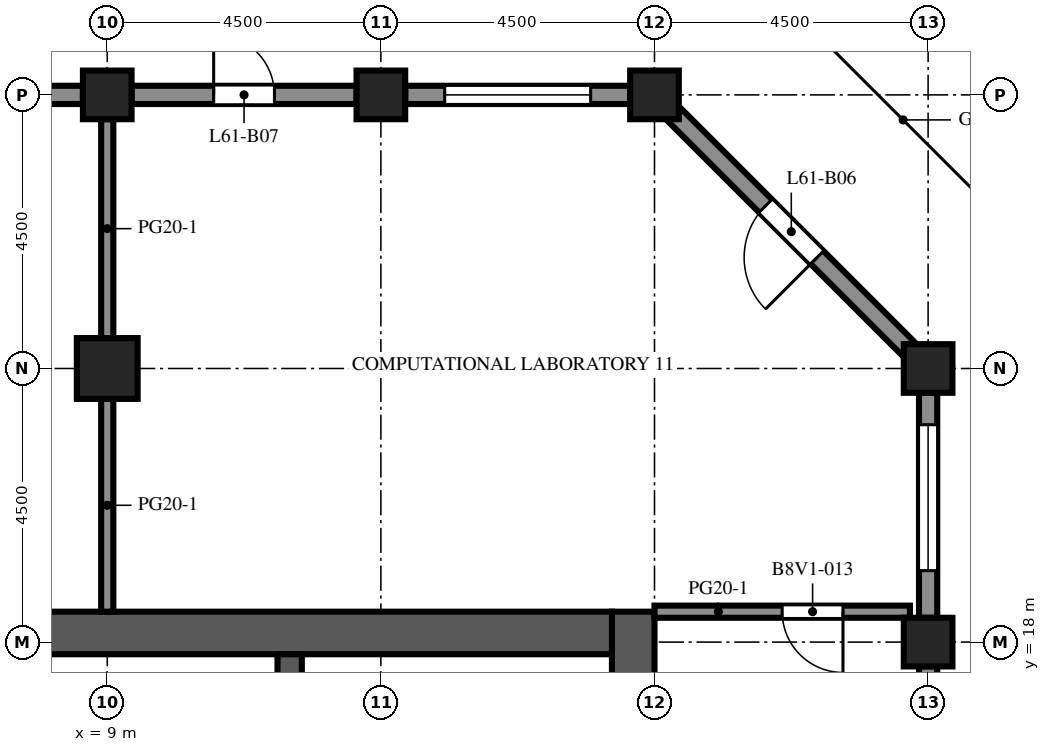
"""IFC4 building model, lengths in metres.
Left out: names, types, materials, properties, quantities, classifications, styles, units other than length and angle.
Written with IfcOpenShell. Run it as: python <this file> out.ifc"""

import sys

from ifc_helpers import new_model, si_unit, direction, frame, frame_2d, origin, origin_2d, place, context, subcontext, project, spatial, rectangle, extrude, element, fill, save


model = new_model("IFC4")
c1 = context("Model", 3, precision=1e-05, world=origin(), true_north=direction((0.0, 1.0)))
c2 = subcontext(c1, "Body", "Model", "MODEL_VIEW")
j1 = project(units=[si_unit("LENGTHUNIT", "METRE"), si_unit("PLANEANGLEUNIT", "RADIAN")], contexts=[c1])
p1 = place(None, origin())
s1 = spatial("IfcSite", under=j1, at=p1, CompositionType="ELEMENT")
p2 = place(p1, origin())
s2 = spatial("IfcBuilding", under=s1, at=p2, CompositionType="ELEMENT")
p3 = place(p2, frame((0.0, 0.0, 270.4)))
s3 = spatial("IfcBuildingStorey", under=s2, at=p3, CompositionType="ELEMENT", Elevation=270.4)
for number, where, z_axis, x_axis in (
    (1, (9.0, 27.0, 0.0), (0.0, 0.0, 1.0), (1.0, 0.0, 0.0)),
    (2, (13.5, 27.0, 0.0), (0.0, 0.0, 1.0), (1.0, 0.0, 0.0)),
    (3, (18.0, 27.0, 0.0), (0.0, 0.0, 1.0), (1.0, 0.0, 0.0)),
    (4, (22.5, 18.0, 0.0), (0.0, 0.0, 1.0), (1.0, 0.0, 0.0)),
    (5, (22.5, 22.5, 0.0), (0.0, 0.0, 1.0), (1.0, 0.0, 0.0)),
):
    element("IfcColumn", number, at=place(p3, frame(where, z_axis=z_axis, x_axis=x_axis)), inside=s3, PredefinedType="COLUMN", context=c2, shape_type="SweptSolid", body=[
        extrude(rectangle(XDim=0.8, YDim=0.8, at=origin_2d()), origin(), (0.0, 0.0, 1.0), 4.1),
    ])
p4 = place(p3, frame((9.0, 22.5, 0.0), z_axis=(0.0, 0.0, 1.0), x_axis=(1.0, 0.0, 0.0)))
e6 = element("IfcColumn", 6, at=p4, inside=s3, PredefinedType="COLUMN", context=c2, shape_type="SweptSolid", body=[
    extrude(rectangle(XDim=1.0, YDim=1.0, at=origin_2d()), origin(), (0.0, 0.0, 1.0), 4.1),
])
p5 = place(p3, frame((17.65, -9.0, 0.0), z_axis=(0.0, 0.0, 1.0), x_axis=(0.0, 1.0, 0.0)))
e7 = element("IfcWall", 7, at=p5, inside=s3, PredefinedType="SHEAR", context=c2, shape_type="SweptSolid", body=[
    extrude(rectangle(XDim=27.5, YDim=0.7, at=frame_2d((13.75, 0.0))), origin(), (0.0, 0.0, 1.0), 4.1),
])
p6 = place(p5, frame((12.55, 0.0, 0.0)))
e8 = element("IfcOpeningElement", 8, at=p6, cuts=e7, PredefinedType="OPENING", context=c2, shape_type="SweptSolid", body=[
    extrude(rectangle(XDim=2.4, YDim=2.4, at=frame_2d((1.2, 1.2))), frame((0.0, 0.36, 0.0), z_axis=(0.0, -1.0, 0.0), x_axis=(1.0, 0.0, 0.0)), (0.0, 0.0, 1.0), 0.72),
])
p7 = place(p5, frame((6.825, 0.0, 0.0)))
e9 = element("IfcOpeningElement", 9, at=p7, cuts=e7, PredefinedType="OPENING", context=c2, shape_type="SweptSolid", body=[
    extrude(rectangle(XDim=1.2, YDim=2.1, at=frame_2d((0.6, 1.05))), frame((0.0, 0.36, 0.0), z_axis=(0.0, -1.0, 0.0), x_axis=(1.0, 0.0, 0.0)), (0.0, 0.0, 1.0), 0.72),
])
p8 = place(p5, frame((19.475, 0.0, 0.0)))
e10 = element("IfcOpeningElement", 10, at=p8, cuts=e7, PredefinedType="OPENING", context=c2, shape_type="SweptSolid", body=[
    extrude(rectangle(XDim=1.2, YDim=2.1, at=frame_2d((0.6, 1.05))), frame((0.0, 0.36, 0.0), z_axis=(0.0, -1.0, 0.0), x_axis=(1.0, 0.0, 0.0)), (0.0, 0.0, 1.0), 0.72),
])
p9 = place(p3, frame((6.7, 18.15, 0.0), z_axis=(0.0, 0.0, 1.0), x_axis=(1.0, 0.0, 0.0)))
e11 = element("IfcWall", 11, at=p9, inside=s3, PredefinedType="SHEAR", context=c2, shape_type="SweptSolid", body=[
    extrude(rectangle(XDim=10.6, YDim=0.7, at=frame_2d((5.3, 0.0))), origin(), (0.0, 0.0, 1.0), 4.1),
])
p10 = place(p3, frame((12.0, 10.2, 0.0), z_axis=(0.0, 0.0, 1.0), x_axis=(0.0, 1.0, 0.0)))
e12 = element("IfcWall", 12, at=p10, inside=s3, PredefinedType="SHEAR", context=c2, shape_type="SweptSolid", body=[
    extrude(rectangle(XDim=7.6, YDim=0.4, at=frame_2d((3.8, 0.0))), origin(), (0.0, 0.0, 1.0), 4.1),
])
p11 = place(p3, frame((22.5, 17.6, 0.0), z_axis=(0.0, 0.0, 1.0), x_axis=(0.0, -1.0, 0.0)))
e13 = element("IfcWall", 13, at=p11, inside=s3, PredefinedType="SOLIDWALL", context=c2, shape_type="SweptSolid", body=[
    extrude(rectangle(XDim=3.7, YDim=0.3, at=frame_2d((1.85, 0.0))), origin(), (0.0, 0.0, 1.0), 2.85),
])
p12 = place(p11, frame((1.35, 0.0, 0.0)))
e14 = element("IfcOpeningElement", 14, at=p12, cuts=e13, PredefinedType="OPENING", context=c2, shape_type="SweptSolid", body=[
    extrude(rectangle(XDim=1.0, YDim=2.2, at=frame_2d((0.5, 1.1))), frame((0.0, 0.16, 0.0), z_axis=(0.0, -1.0, 0.0), x_axis=(1.0, 0.0, 0.0)), (0.0, 0.0, 1.0), 0.32),
])
p13 = place(p3, frame((22.5, 22.1, 0.0), z_axis=(0.0, 0.0, 1.0), x_axis=(0.0, -1.0, 0.0)))
e15 = element("IfcWall", 15, at=p13, inside=s3, PredefinedType="SOLIDWALL", context=c2, shape_type="SweptSolid", body=[
    extrude(rectangle(XDim=3.7, YDim=0.3, at=frame_2d((1.85, 0.0))), origin(), (0.0, 0.0, 1.0), 2.85),
])
p14 = place(p13, frame((0.525, 0.0, 0.8)))
e16 = element("IfcOpeningElement", 16, at=p14, cuts=e15, PredefinedType="OPENING", context=c2, shape_type="SweptSolid", body=[
    extrude(rectangle(XDim=2.4, YDim=1.7, at=frame_2d((1.2, 0.85))), frame((0.0, 0.16, 0.0), z_axis=(0.0, -1.0, 0.0), x_axis=(1.0, 0.0, 0.0)), (0.0, 0.0, 1.0), 0.32),
])
p15 = place(p3, frame((18.294, 26.706, 0.0), z_axis=(0.0, 0.0, 1.0), x_axis=(0.707106781187, -0.707106781187, 0.0)))
e17 = element("IfcWall", 17, at=p15, inside=s3, PredefinedType="SOLIDWALL", context=c2, shape_type="SweptSolid", body=[
    extrude(rectangle(XDim=5.532, YDim=0.3, at=frame_2d((2.766, 0.0))), origin(), (0.0, 0.0, 1.0), 2.85),
])
p16 = place(p15, frame((2.166, 0.0, 0.0)))
e18 = element("IfcOpeningElement", 18, at=p16, cuts=e17, PredefinedType="OPENING", context=c2, shape_type="SweptSolid", body=[
    extrude(rectangle(XDim=1.2, YDim=2.2, at=frame_2d((0.6, 1.1))), frame((0.0, 0.16, 0.0), z_axis=(0.0, -1.0, 0.0), x_axis=(1.0, 0.0, 0.0)), (0.0, 0.0, 1.0), 0.32),
])
p17 = place(p3, frame((13.9, 27.0, 0.0), z_axis=(0.0, 0.0, 1.0), x_axis=(1.0, 0.0, 0.0)))
e19 = element("IfcWall", 19, at=p17, inside=s3, PredefinedType="SOLIDWALL", context=c2, shape_type="SweptSolid", body=[
    extrude(rectangle(XDim=3.7, YDim=0.3, at=frame_2d((1.85, 0.0))), origin(), (0.0, 0.0, 1.0), 2.85),
])
p18 = place(p17, frame((0.65, 0.0, 0.8)))
e20 = element("IfcOpeningElement", 20, at=p18, cuts=e19, PredefinedType="OPENING", context=c2, shape_type="SweptSolid", body=[
    extrude(rectangle(XDim=2.4, YDim=1.7, at=frame_2d((1.2, 0.85))), frame((0.0, 0.16, 0.0), z_axis=(0.0, -1.0, 0.0), x_axis=(1.0, 0.0, 0.0)), (0.0, 0.0, 1.0), 0.32),
])
p19 = place(p3, frame((9.4, 27.0, 0.0), z_axis=(0.0, 0.0, 1.0), x_axis=(1.0, 0.0, 0.0)))
e21 = element("IfcWall", 21, at=p19, inside=s3, PredefinedType="SOLIDWALL", context=c2, shape_type="SweptSolid", body=[
    extrude(rectangle(XDim=3.7, YDim=0.3, at=frame_2d((1.85, 0.0))), origin(), (0.0, 0.0, 1.0), 2.85),
])
p20 = place(p19, frame((1.35, 0.0, 0.0)))
e22 = element("IfcOpeningElement", 22, at=p20, cuts=e21, PredefinedType="OPENING", context=c2, shape_type="SweptSolid", body=[
    extrude(rectangle(XDim=1.0, YDim=2.2, at=frame_2d((0.5, 1.1))), frame((0.0, 0.16, 0.0), z_axis=(0.0, -1.0, 0.0), x_axis=(1.0, 0.0, 0.0)), (0.0, 0.0, 1.0), 0.32),
])
p21 = place(p3, frame((4.9, 27.0, 0.0), z_axis=(0.0, 0.0, 1.0), x_axis=(1.0, 0.0, 0.0)))
e23 = element("IfcWall", 23, at=p21, inside=s3, PredefinedType="SOLIDWALL", context=c2, shape_type="SweptSolid", body=[
    extrude(rectangle(XDim=3.7, YDim=0.3, at=frame_2d((1.85, 0.0))), origin(), (0.0, 0.0, 1.0), 2.85),
])
p22 = place(p21, frame((0.65, 0.0, 0.8)))
e24 = element("IfcOpeningElement", 24, at=p22, cuts=e23, PredefinedType="OPENING", context=c2, shape_type="SweptSolid", body=[
    extrude(rectangle(XDim=2.4, YDim=1.7, at=frame_2d((1.2, 0.85))), frame((0.0, 0.16, 0.0), z_axis=(0.0, -1.0, 0.0), x_axis=(1.0, 0.0, 0.0)), (0.0, 0.0, 1.0), 0.32),
])
p23 = place(p3, frame((9.0, 18.5, 0.0), z_axis=(0.0, 0.0, 1.0), x_axis=(0.0, 1.0, 0.0)))
e25 = element("IfcWall", 25, at=p23, inside=s3, PredefinedType="PARTITIONING", context=c2, shape_type="SweptSolid", body=[
    extrude(rectangle(XDim=3.5, YDim=0.2, at=frame_2d((1.75, 0.0))), origin(), (0.0, 0.0, 1.0), 3.65),
])
p24 = place(p3, frame((9.0, 23.0, 0.0), z_axis=(0.0, 0.0, 1.0), x_axis=(0.0, 1.0, 0.0)))
e26 = element("IfcWall", 26, at=p24, inside=s3, PredefinedType="PARTITIONING", context=c2, shape_type="SweptSolid", body=[
    extrude(rectangle(XDim=3.6, YDim=0.2, at=frame_2d((1.8, 0.0))), origin(), (0.0, 0.0, 1.0), 3.65),
])
p25 = place(p3, frame((18.0, 18.5, 0.0), z_axis=(0.0, 0.0, 1.0), x_axis=(1.0, 0.0, 0.0)))
e27 = element("IfcWall", 27, at=p25, inside=s3, PredefinedType="PARTITIONING", context=c2, shape_type="SweptSolid", body=[
    extrude(rectangle(XDim=4.201, YDim=0.2, at=frame_2d((2.101, 0.0))), origin(), (0.0, 0.0, 1.0), 3.65),
])
p26 = place(p25, frame((2.1, 0.0, 0.0)))
e28 = element("IfcOpeningElement", 28, at=p26, cuts=e27, PredefinedType="OPENING", context=c2, shape_type="SweptSolid", body=[
    extrude(rectangle(XDim=1.0, YDim=2.1, at=frame_2d((0.5, 1.05))), frame((0.0, 0.11, 0.0), z_axis=(0.0, -1.0, 0.0), x_axis=(1.0, 0.0, 0.0)), (0.0, 0.0, 1.0), 0.22),
])
p27 = place(p14, origin())
e29 = element("IfcWindow", 29, at=p27, inside=s3, PartitioningType="SINGLE_PANEL", PredefinedType="WINDOW", context=c2, shape_type="SweptSolid", body=[
    extrude(rectangle(XDim=2.4, YDim=1.7, at=frame_2d((1.2, 0.85))), frame((0.0, 0.03, 0.0), z_axis=(0.0, -1.0, 0.0), x_axis=(1.0, 0.0, 0.0)), (0.0, 0.0, 1.0), 0.06),
])
fill(e16, e29)
p28 = place(p16, origin())
e30 = element("IfcDoor", 30, at=p28, inside=s3, OperationType="SINGLE_SWING_RIGHT", PredefinedType="DOOR", context=c2, shape_type="SweptSolid", body=[
    extrude(rectangle(XDim=1.2, YDim=2.2, at=frame_2d((0.6, 1.1))), frame((0.0, 0.025, 0.0), z_axis=(0.0, -1.0, 0.0), x_axis=(1.0, 0.0, 0.0)), (0.0, 0.0, 1.0), 0.05),
])
fill(e18, e30)
p29 = place(p18, origin())
e31 = element("IfcWindow", 31, at=p29, inside=s3, PartitioningType="SINGLE_PANEL", PredefinedType="WINDOW", context=c2, shape_type="SweptSolid", body=[
    extrude(rectangle(XDim=2.4, YDim=1.7, at=frame_2d((1.2, 0.85))), frame((0.0, 0.03, 0.0), z_axis=(0.0, -1.0, 0.0), x_axis=(1.0, 0.0, 0.0)), (0.0, 0.0, 1.0), 0.06),
])
fill(e20, e31)
p30 = place(p20, origin())
e32 = element("IfcDoor", 32, at=p30, inside=s3, OperationType="SINGLE_SWING_LEFT", PredefinedType="DOOR", context=c2, shape_type="SweptSolid", body=[
    extrude(rectangle(XDim=1.0, YDim=2.2, at=frame_2d((0.5, 1.1))), frame((0.0, 0.025, 0.0), z_axis=(0.0, -1.0, 0.0), x_axis=(1.0, 0.0, 0.0)), (0.0, 0.0, 1.0), 0.05),
])
fill(e22, e32)
p31 = place(p26, origin())
e33 = element("IfcDoor", 33, at=p31, inside=s3, OperationType="SINGLE_SWING_RIGHT", PredefinedType="DOOR", context=c2, shape_type="SweptSolid", body=[
    extrude(rectangle(XDim=1.0, YDim=2.1, at=frame_2d((0.5, 1.05))), frame((0.0, 0.025, 0.0), z_axis=(0.0, -1.0, 0.0), x_axis=(1.0, 0.0, 0.0)), (0.0, 0.0, 1.0), 0.05),
])
fill(e28, e33)
save(model, sys.argv[1])
